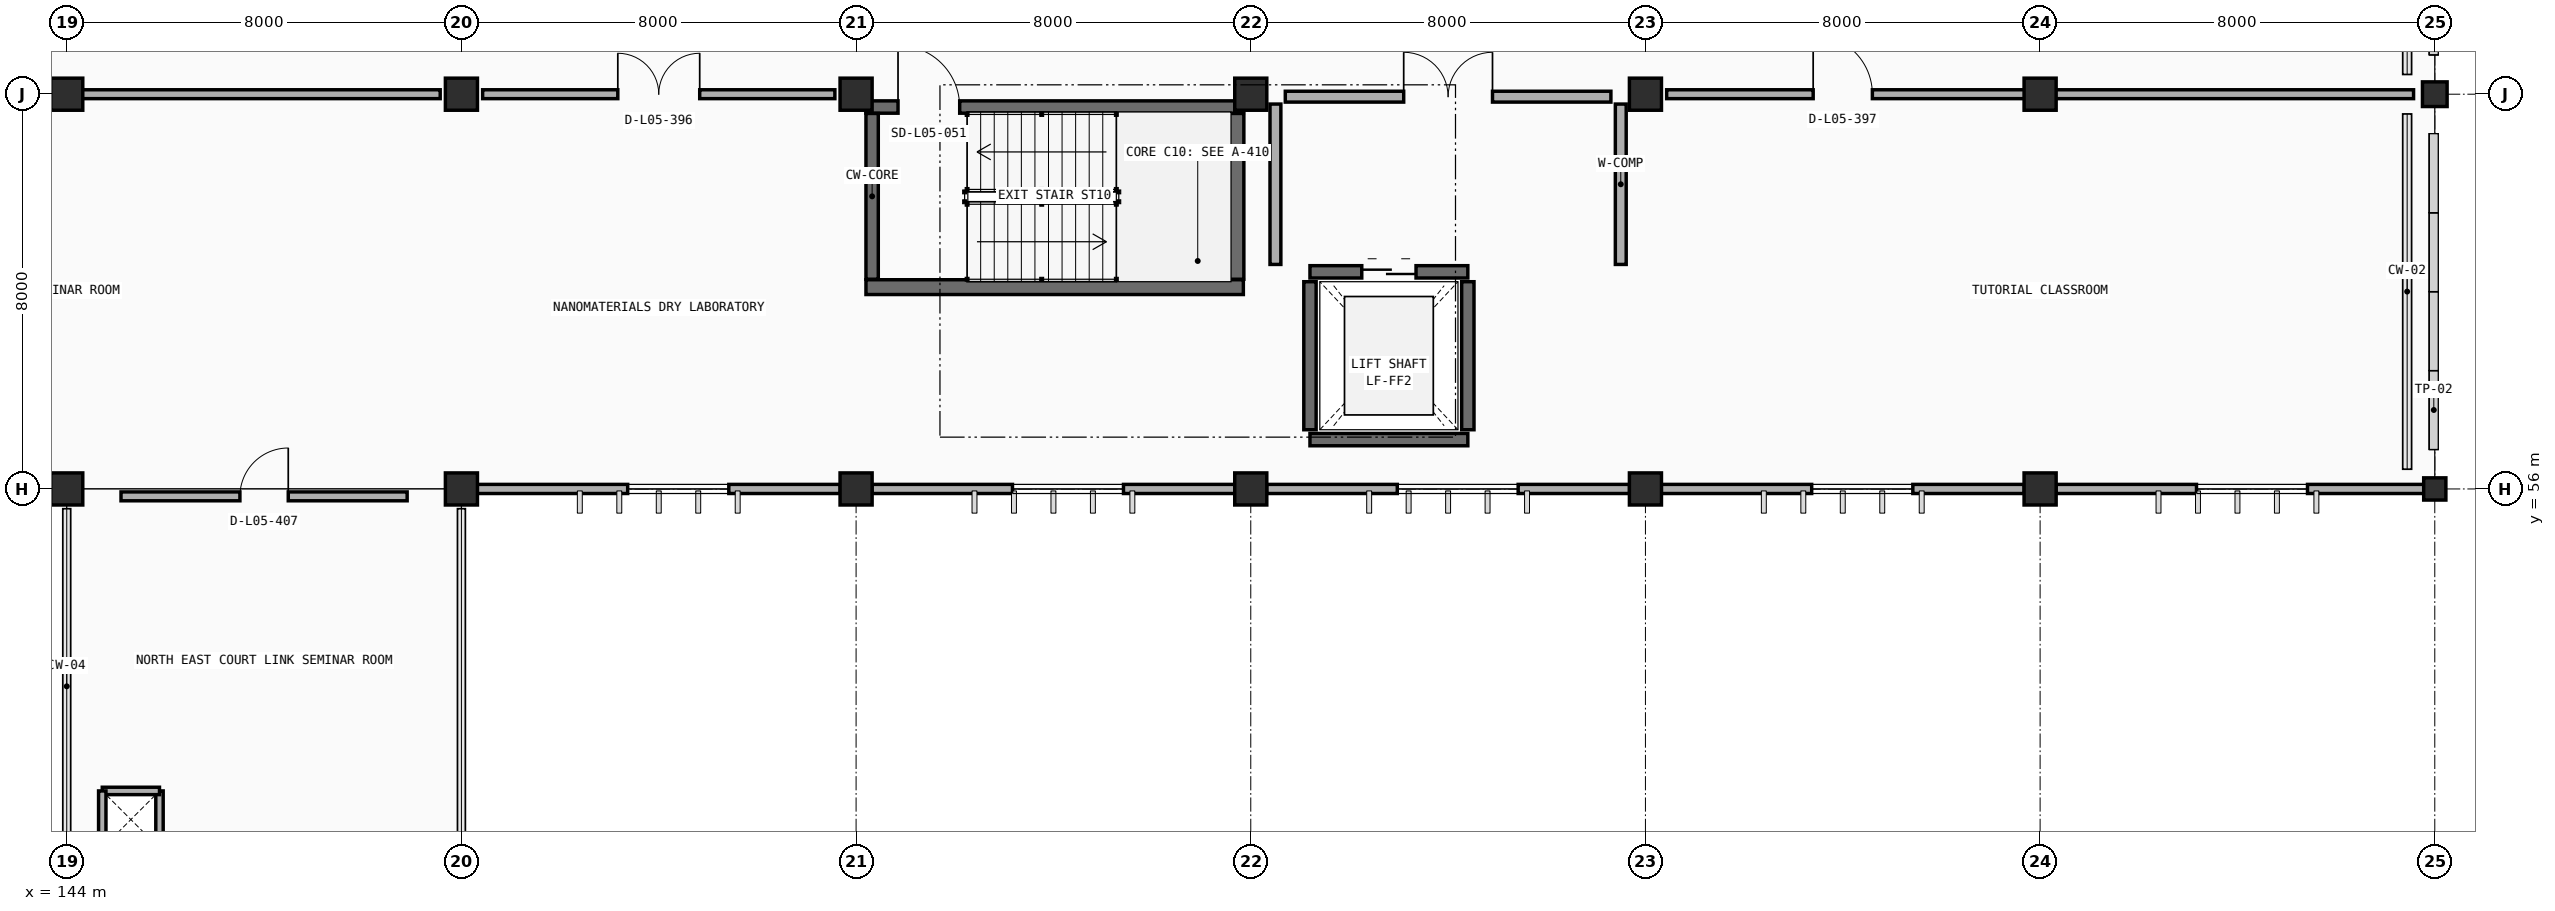
"""IFC4 building model, lengths in metres.
Left out: names, types, materials, properties, quantities, classifications, styles, units other than length and angle.
Written with IfcOpenShell. Run it as: python <this file> out.ifc"""

import sys

from ifc_helpers import new_model, si_unit, direction, frame, frame_2d, origin, origin_2d, place, context, subcontext, project, spatial, rectangle, extrude, element, fill, save


model = new_model("IFC4")
c1 = context("Model", 3, precision=1e-05, world=origin(), true_north=direction((0.0, 1.0)))
c2 = subcontext(c1, "Body", "Model", "MODEL_VIEW")
j1 = project(units=[si_unit("LENGTHUNIT", "METRE"), si_unit("PLANEANGLEUNIT", "RADIAN")], contexts=[c1])
p1 = place(None, origin())
s1 = spatial("IfcSite", under=j1, at=p1, CompositionType="ELEMENT")
p2 = place(p1, origin())
s2 = spatial("IfcBuilding", under=s1, at=p2, CompositionType="ELEMENT")
p3 = place(p2, frame((0.0, 0.0, 18.0)))
s3 = spatial("IfcBuildingStorey", under=s2, at=p3, CompositionType="ELEMENT", Elevation=18.0)
for number, where, z_axis, x_axis in (
    (1, (144.0, 56.0, 0.0), (0.0, 0.0, 1.0), (1.0, 0.0, 0.0)),
    (2, (152.0, 56.0, 0.0), (0.0, 0.0, 1.0), (1.0, 0.0, 0.0)),
    (3, (160.0, 56.0, 0.0), (0.0, 0.0, 1.0), (1.0, 0.0, 0.0)),
    (4, (168.0, 56.0, 0.0), (0.0, 0.0, 1.0), (1.0, 0.0, 0.0)),
    (5, (176.0, 56.0, 0.0), (0.0, 0.0, 1.0), (1.0, 0.0, 0.0)),
    (6, (184.0, 56.0, 0.0), (0.0, 0.0, 1.0), (1.0, 0.0, 0.0)),
):
    element("IfcColumn", number, at=place(p3, frame(where, z_axis=z_axis, x_axis=x_axis)), inside=s3, PredefinedType="COLUMN", context=c2, shape_type="SweptSolid", body=[
        extrude(rectangle(XDim=0.65, YDim=0.65, at=origin_2d()), origin(), (0.0, 0.0, 1.0), 4.2),
    ])
p4 = place(p3, frame((192.0, 56.0, 0.0), z_axis=(0.0, 0.0, 1.0), x_axis=(1.0, 0.0, 0.0)))
e7 = element("IfcColumn", 7, at=p4, inside=s3, PredefinedType="COLUMN", context=c2, shape_type="SweptSolid", body=[
    extrude(rectangle(XDim=0.45, YDim=0.45, at=origin_2d()), origin(), (0.0, 0.0, 1.0), 4.2),
])
for number, where, z_axis, x_axis in (
    (8, (144.0, 64.0, 0.0), (0.0, 0.0, 1.0), (1.0, 0.0, 0.0)),
    (9, (152.0, 64.0, 0.0), (0.0, 0.0, 1.0), (1.0, 0.0, 0.0)),
    (10, (160.0, 64.0, 0.0), (0.0, 0.0, 1.0), (1.0, 0.0, 0.0)),
    (11, (168.0, 64.0, 0.0), (0.0, 0.0, 1.0), (1.0, 0.0, 0.0)),
    (12, (176.0, 64.0, 0.0), (0.0, 0.0, 1.0), (1.0, 0.0, 0.0)),
    (13, (184.0, 64.0, 0.0), (0.0, 0.0, 1.0), (1.0, 0.0, 0.0)),
):
    element("IfcColumn", number, at=place(p3, frame(where, z_axis=z_axis, x_axis=x_axis)), inside=s3, PredefinedType="COLUMN", context=c2, shape_type="SweptSolid", body=[
        extrude(rectangle(XDim=0.65, YDim=0.65, at=origin_2d()), origin(), (0.0, 0.0, 1.0), 4.2),
    ])
p5 = place(p3, frame((192.0, 64.0, 0.0), z_axis=(0.0, 0.0, 1.0), x_axis=(1.0, 0.0, 0.0)))
e14 = element("IfcColumn", 14, at=p5, inside=s3, PredefinedType="COLUMN", context=c2, shape_type="SweptSolid", body=[
    extrude(rectangle(XDim=0.5, YDim=0.5, at=origin_2d()), origin(), (0.0, 0.0, 1.0), 4.2),
])
p6 = place(p3, frame((159.678, 56.0, 0.0), z_axis=(0.0, 0.0, 1.0), x_axis=(-1.0, 0.0, 0.0)))
e15 = element("IfcWall", 15, at=p6, inside=s3, PredefinedType="STANDARD", context=c2, shape_type="SweptSolid", body=[
    extrude(rectangle(XDim=7.356, YDim=0.185, at=frame_2d((3.678, 0.0))), origin(), (0.0, 0.0, 1.0), 3.335),
])
p7 = place(p6, frame((2.258, 0.0, 0.9)))
e16 = element("IfcOpeningElement", 16, at=p7, cuts=e15, PredefinedType="OPENING", context=c2, shape_type="SweptSolid", body=[
    extrude(rectangle(XDim=2.05, YDim=2.0, at=frame_2d((1.025, 1.0))), frame((0.0, 0.103, 0.0), z_axis=(0.0, -1.0, 0.0), x_axis=(1.0, 0.0, 0.0)), (0.0, 0.0, 1.0), 0.205),
])
p8 = place(p3, frame((167.678, 56.0, 0.0), z_axis=(0.0, 0.0, 1.0), x_axis=(-1.0, 0.0, 0.0)))
e17 = element("IfcWall", 17, at=p8, inside=s3, PredefinedType="STANDARD", context=c2, shape_type="SweptSolid", body=[
    extrude(rectangle(XDim=7.356, YDim=0.185, at=frame_2d((3.678, 0.0))), origin(), (0.0, 0.0, 1.0), 3.335),
])
p9 = place(p8, frame((2.258, 0.0, 0.9)))
e18 = element("IfcOpeningElement", 18, at=p9, cuts=e17, PredefinedType="OPENING", context=c2, shape_type="SweptSolid", body=[
    extrude(rectangle(XDim=2.25, YDim=2.0, at=frame_2d((1.125, 1.0))), frame((0.0, 0.103, 0.0), z_axis=(0.0, -1.0, 0.0), x_axis=(1.0, 0.0, 0.0)), (0.0, 0.0, 1.0), 0.205),
])
p10 = place(p3, frame((175.678, 56.0, 0.0), z_axis=(0.0, 0.0, 1.0), x_axis=(-1.0, 0.0, 0.0)))
e19 = element("IfcWall", 19, at=p10, inside=s3, PredefinedType="STANDARD", context=c2, shape_type="SweptSolid", body=[
    extrude(rectangle(XDim=7.356, YDim=0.185, at=frame_2d((3.678, 0.0))), origin(), (0.0, 0.0, 1.0), 3.335),
])
p11 = place(p10, frame((2.258, 0.0, 0.9)))
e20 = element("IfcOpeningElement", 20, at=p11, cuts=e19, PredefinedType="OPENING", context=c2, shape_type="SweptSolid", body=[
    extrude(rectangle(XDim=2.45, YDim=2.0, at=frame_2d((1.225, 1.0))), frame((0.0, 0.103, 0.0), z_axis=(0.0, -1.0, 0.0), x_axis=(1.0, 0.0, 0.0)), (0.0, 0.0, 1.0), 0.205),
])
p12 = place(p3, frame((183.678, 56.0, 0.0), z_axis=(0.0, 0.0, 1.0), x_axis=(-1.0, 0.0, 0.0)))
e21 = element("IfcWall", 21, at=p12, inside=s3, PredefinedType="STANDARD", context=c2, shape_type="SweptSolid", body=[
    extrude(rectangle(XDim=7.356, YDim=0.185, at=frame_2d((3.678, 0.0))), origin(), (0.0, 0.0, 1.0), 3.335),
])
p13 = place(p12, frame((2.258, 0.0, 0.9)))
e22 = element("IfcOpeningElement", 22, at=p13, cuts=e21, PredefinedType="OPENING", context=c2, shape_type="SweptSolid", body=[
    extrude(rectangle(XDim=2.05, YDim=2.0, at=frame_2d((1.025, 1.0))), frame((0.0, 0.103, 0.0), z_axis=(0.0, -1.0, 0.0), x_axis=(1.0, 0.0, 0.0)), (0.0, 0.0, 1.0), 0.205),
])
p14 = place(p3, frame((191.778, 56.0, 0.0), z_axis=(0.0, 0.0, 1.0), x_axis=(-1.0, 0.0, 0.0)))
e23 = element("IfcWall", 23, at=p14, inside=s3, PredefinedType="STANDARD", context=c2, shape_type="SweptSolid", body=[
    extrude(rectangle(XDim=7.456, YDim=0.185, at=frame_2d((3.728, 0.0))), origin(), (0.0, 0.0, 1.0), 3.35),
])
p15 = place(p14, frame((2.358, 0.0, 0.9)))
e24 = element("IfcOpeningElement", 24, at=p15, cuts=e23, PredefinedType="OPENING", context=c2, shape_type="SweptSolid", body=[
    extrude(rectangle(XDim=2.25, YDim=2.0, at=frame_2d((1.125, 1.0))), frame((0.0, 0.103, 0.0), z_axis=(0.0, -1.0, 0.0), x_axis=(1.0, 0.0, 0.0)), (0.0, 0.0, 1.0), 0.205),
])
for number, where, z_axis, x_axis in (
    (25, (191.76, 56.22, 0.0), (0.0, 0.0, 1.0), (-1.0, 0.0, 0.0)),
    (26, (191.76, 63.78, 0.0), (0.0, 0.0, 1.0), (-1.0, 0.0, 0.0)),
    (27, (191.76, 64.22, 0.0), (0.0, 0.0, 1.0), (-1.0, 0.0, 0.0)),
):
    element("IfcWall", number, at=place(p3, frame(where, z_axis=z_axis, x_axis=x_axis)), inside=s3, PredefinedType="PARAPET", context=c2, shape_type="SweptSolid", body=[
        extrude(rectangle(XDim=0.32, YDim=0.2, at=frame_2d((0.16, 0.0))), origin(), (0.0, 0.0, 1.0), 3.35),
    ])
p16 = place(p3, frame((160.2, 60.09, 0.0), z_axis=(0.0, 0.0, 1.0), x_axis=(1.0, 0.0, 0.0)))
e28 = element("IfcWall", 28, at=p16, inside=s3, PredefinedType="SHEAR", context=c2, shape_type="SweptSolid", body=[
    extrude(rectangle(XDim=7.65, YDim=0.3, at=frame_2d((3.825, 0.0))), origin(), (0.0, 0.0, 1.0), 4.2),
])
p17 = place(p3, frame((167.71, 60.25, 0.0), z_axis=(0.0, 0.0, 1.0), x_axis=(0.0, 1.0, 0.0)))
e29 = element("IfcWall", 29, at=p17, inside=s3, PredefinedType="SHEAR", context=c2, shape_type="SweptSolid", body=[
    extrude(rectangle(XDim=3.36, YDim=0.3, at=frame_2d((1.68, 0.0))), origin(), (0.0, 0.0, 1.0), 4.2),
])
p18 = place(p3, frame((160.2, 63.74, 0.0), z_axis=(0.0, 0.0, 1.0), x_axis=(1.0, 0.0, 0.0)))
e30 = element("IfcWall", 30, at=p18, inside=s3, PredefinedType="SOLIDWALL", context=c2, shape_type="SweptSolid", body=[
    extrude(rectangle(XDim=7.65, YDim=0.25, at=frame_2d((3.825, 0.0))), origin(), (0.0, 0.0, 1.0), 4.2),
])
p19 = place(p18, frame((0.65, 0.0, 0.0)))
e31 = element("IfcOpeningElement", 31, at=p19, cuts=e30, PredefinedType="OPENING", context=c2, shape_type="SweptSolid", body=[
    extrude(rectangle(XDim=1.25, YDim=2.15, at=frame_2d((0.625, 1.075))), frame((0.0, 0.135, 0.0), z_axis=(0.0, -1.0, 0.0), x_axis=(1.0, 0.0, 0.0)), (0.0, 0.0, 1.0), 0.27),
])
p20 = place(p3, frame((160.325, 60.25, 0.0), z_axis=(0.0, 0.0, 1.0), x_axis=(0.0, 1.0, 0.0)))
e32 = element("IfcWall", 32, at=p20, inside=s3, PredefinedType="SOLIDWALL", context=c2, shape_type="SweptSolid", body=[
    extrude(rectangle(XDim=3.36, YDim=0.25, at=frame_2d((1.68, 0.0))), origin(), (0.0, 0.0, 1.0), 4.2),
])
p21 = place(p3, frame((169.2, 57.0, 0.0), z_axis=(0.0, 0.0, 1.0), x_axis=(1.0, 0.0, 0.0)))
e33 = element("IfcWall", 33, at=p21, inside=s3, PredefinedType="SOLIDWALL", context=c2, shape_type="SweptSolid", body=[
    extrude(rectangle(XDim=3.2, YDim=0.25, at=frame_2d((1.6, 0.0))), origin(), (0.0, 0.0, 1.0), 4.2),
])
p22 = place(p3, frame((169.2, 60.4, 0.0), z_axis=(0.0, 0.0, 1.0), x_axis=(1.0, 0.0, 0.0)))
e34 = element("IfcWall", 34, at=p22, inside=s3, PredefinedType="SOLIDWALL", context=c2, shape_type="SweptSolid", body=[
    extrude(rectangle(XDim=3.2, YDim=0.25, at=frame_2d((1.6, 0.0))), origin(), (0.0, 0.0, 1.0), 4.2),
])
p23 = place(p22, frame((1.05, 0.0, 0.0)))
e35 = element("IfcOpeningElement", 35, at=p23, cuts=e34, PredefinedType="OPENING", context=c2, shape_type="SweptSolid", body=[
    extrude(rectangle(XDim=1.1, YDim=2.15, at=frame_2d((0.55, 1.075))), frame((0.0, 0.135, 0.0), z_axis=(0.0, -1.0, 0.0), x_axis=(1.0, 0.0, 0.0)), (0.0, 0.0, 1.0), 0.27),
])
for number, where, z_axis, x_axis in (
    (36, (169.2, 57.2, 0.0), (0.0, 0.0, 1.0), (0.0, 1.0, 0.0)),
    (37, (172.4, 57.2, 0.0), (0.0, 0.0, 1.0), (0.0, 1.0, 0.0)),
):
    element("IfcWall", number, at=place(p3, frame(where, z_axis=z_axis, x_axis=x_axis)), inside=s3, PredefinedType="SOLIDWALL", context=c2, shape_type="SweptSolid", body=[
        extrude(rectangle(XDim=3.0, YDim=0.25, at=frame_2d((1.5, 0.0))), origin(), (0.0, 0.0, 1.0), 4.2),
    ])
p24 = place(p3, frame((168.7, 63.95, 0.0), z_axis=(0.0, 0.0, 1.0), x_axis=(1.0, 0.0, 0.0)))
e38 = element("IfcWall", 38, at=p24, inside=s3, PredefinedType="PARTITIONING", context=c2, shape_type="SweptSolid", body=[
    extrude(rectangle(XDim=6.6, YDim=0.22, at=frame_2d((3.3, 0.0))), origin(), (0.0, 0.0, 1.0), 3.3),
])
p25 = place(p24, frame((2.4, 0.0, 0.0)))
e39 = element("IfcOpeningElement", 39, at=p25, cuts=e38, PredefinedType="OPENING", context=c2, shape_type="SweptSolid", body=[
    extrude(rectangle(XDim=1.8, YDim=2.2, at=frame_2d((0.9, 1.1))), frame((0.0, 0.12, 0.0), z_axis=(0.0, -1.0, 0.0), x_axis=(1.0, 0.0, 0.0)), (0.0, 0.0, 1.0), 0.24),
])
for number, where, z_axis, x_axis in (
    (40, (168.5, 60.55, 0.0), (0.0, 0.0, 1.0), (0.0, 1.0, 0.0)),
    (41, (175.5, 60.55, 0.0), (0.0, 0.0, 1.0), (0.0, 1.0, 0.0)),
):
    element("IfcWall", number, at=place(p3, frame(where, z_axis=z_axis, x_axis=x_axis)), inside=s3, PredefinedType="PARTITIONING", context=c2, shape_type="SweptSolid", body=[
        extrude(rectangle(XDim=3.25, YDim=0.22, at=frame_2d((1.625, 0.0))), origin(), (0.0, 0.0, 1.0), 3.3),
    ])
for number, where, z_axis, x_axis in (
    (42, (145.88, 48.72, 0.0), (0.0, 0.0, 1.0), (0.0, 1.0, 0.0)),
    (43, (145.88, 49.88, 0.0), (0.0, 0.0, 1.0), (-1.0, 0.0, 0.0)),
    (44, (144.72, 49.88, 0.0), (0.0, 0.0, 1.0), (0.0, -1.0, 0.0)),
):
    element("IfcWall", number, at=place(p3, frame(where, z_axis=z_axis, x_axis=x_axis)), inside=s3, PredefinedType="PARTITIONING", context=c2, shape_type="SweptSolid", body=[
        extrude(rectangle(XDim=1.16, YDim=0.15, at=frame_2d((0.58, 0.0))), origin(), (0.0, 0.0, 1.0), 3.9),
    ])
p26 = place(p3, frame((136.43, 64.0, 0.0), z_axis=(0.0, 0.0, 1.0), x_axis=(1.0, 0.0, 0.0)))
e45 = element("IfcWall", 45, at=p26, inside=s3, PredefinedType="PARTITIONING", context=c2, shape_type="SweptSolid", body=[
    extrude(rectangle(XDim=15.14, YDim=0.18, at=frame_2d((7.57, 0.0))), origin(), (0.0, 0.0, 1.0), 3.3),
])
p27 = place(p26, frame((3.0, 0.0, 0.0)))
e46 = element("IfcOpeningElement", 46, at=p27, cuts=e45, PredefinedType="OPENING", context=c2, shape_type="SweptSolid", body=[
    extrude(rectangle(XDim=1.14, YDim=2.15, at=frame_2d((0.57, 1.075))), frame((0.0, 0.1, 0.0), z_axis=(0.0, -1.0, 0.0), x_axis=(1.0, 0.0, 0.0)), (0.0, 0.0, 1.0), 0.2),
])
p28 = place(p3, frame((152.43, 64.0, 0.0), z_axis=(0.0, 0.0, 1.0), x_axis=(1.0, 0.0, 0.0)))
e47 = element("IfcWall", 47, at=p28, inside=s3, PredefinedType="PARTITIONING", context=c2, shape_type="SweptSolid", body=[
    extrude(rectangle(XDim=7.14, YDim=0.18, at=frame_2d((3.57, 0.0))), origin(), (0.0, 0.0, 1.0), 3.3),
])
p29 = place(p28, frame((2.74, 0.0, 0.0)))
e48 = element("IfcOpeningElement", 48, at=p29, cuts=e47, PredefinedType="OPENING", context=c2, shape_type="SweptSolid", body=[
    extrude(rectangle(XDim=1.66, YDim=2.22, at=frame_2d((0.83, 1.11))), frame((0.0, 0.1, 0.0), z_axis=(0.0, -1.0, 0.0), x_axis=(1.0, 0.0, 0.0)), (0.0, 0.0, 1.0), 0.2),
])
p30 = place(p3, frame((176.43, 64.0, 0.0), z_axis=(0.0, 0.0, 1.0), x_axis=(1.0, 0.0, 0.0)))
e49 = element("IfcWall", 49, at=p30, inside=s3, PredefinedType="PARTITIONING", context=c2, shape_type="SweptSolid", body=[
    extrude(rectangle(XDim=15.14, YDim=0.18, at=frame_2d((7.57, 0.0))), origin(), (0.0, 0.0, 1.0), 3.3),
])
p31 = place(p30, frame((2.97, 0.0, 0.0)))
e50 = element("IfcOpeningElement", 50, at=p31, cuts=e49, PredefinedType="OPENING", context=c2, shape_type="SweptSolid", body=[
    extrude(rectangle(XDim=1.2, YDim=2.2, at=frame_2d((0.6, 1.1))), frame((0.0, 0.1, 0.0), z_axis=(0.0, -1.0, 0.0), x_axis=(1.0, 0.0, 0.0)), (0.0, 0.0, 1.0), 0.2),
])
p32 = place(p3, frame((145.1, 55.85, 0.0), z_axis=(0.0, 0.0, 1.0), x_axis=(1.0, 0.0, 0.0)))
e51 = element("IfcWall", 51, at=p32, inside=s3, PredefinedType="PARTITIONING", context=c2, shape_type="SweptSolid", body=[
    extrude(rectangle(XDim=5.8, YDim=0.18, at=frame_2d((2.9, 0.0))), origin(), (0.0, 0.0, 1.0), 3.3),
])
p33 = place(p32, frame((2.41, 0.0, 0.0)))
e52 = element("IfcOpeningElement", 52, at=p33, cuts=e51, PredefinedType="OPENING", context=c2, shape_type="SweptSolid", body=[
    extrude(rectangle(XDim=0.98, YDim=2.1, at=frame_2d((0.49, 1.05))), frame((0.0, 0.1, 0.0), z_axis=(0.0, -1.0, 0.0), x_axis=(1.0, 0.0, 0.0)), (0.0, 0.0, 1.0), 0.2),
])
p34 = place(p7, origin())
e53 = element("IfcWindow", 53, at=p34, inside=s3, PartitioningType="DOUBLE_PANEL_VERTICAL", PredefinedType="WINDOW", context=c2, shape_type="SweptSolid", body=[
    extrude(rectangle(XDim=2.05, YDim=2.0, at=frame_2d((1.025, 1.0))), frame((0.0, 0.03, 0.0), z_axis=(0.0, -1.0, 0.0), x_axis=(1.0, 0.0, 0.0)), (0.0, 0.0, 1.0), 0.06),
])
fill(e16, e53)
p35 = place(p9, origin())
e54 = element("IfcWindow", 54, at=p35, inside=s3, PartitioningType="DOUBLE_PANEL_VERTICAL", PredefinedType="WINDOW", context=c2, shape_type="SweptSolid", body=[
    extrude(rectangle(XDim=2.25, YDim=2.0, at=frame_2d((1.125, 1.0))), frame((0.0, 0.03, 0.0), z_axis=(0.0, -1.0, 0.0), x_axis=(1.0, 0.0, 0.0)), (0.0, 0.0, 1.0), 0.06),
])
fill(e18, e54)
p36 = place(p11, origin())
e55 = element("IfcWindow", 55, at=p36, inside=s3, PartitioningType="DOUBLE_PANEL_VERTICAL", PredefinedType="WINDOW", context=c2, shape_type="SweptSolid", body=[
    extrude(rectangle(XDim=2.45, YDim=2.0, at=frame_2d((1.225, 1.0))), frame((0.0, 0.03, 0.0), z_axis=(0.0, -1.0, 0.0), x_axis=(1.0, 0.0, 0.0)), (0.0, 0.0, 1.0), 0.06),
])
fill(e20, e55)
p37 = place(p13, origin())
e56 = element("IfcWindow", 56, at=p37, inside=s3, PartitioningType="DOUBLE_PANEL_VERTICAL", PredefinedType="WINDOW", context=c2, shape_type="SweptSolid", body=[
    extrude(rectangle(XDim=2.05, YDim=2.0, at=frame_2d((1.025, 1.0))), frame((0.0, 0.03, 0.0), z_axis=(0.0, -1.0, 0.0), x_axis=(1.0, 0.0, 0.0)), (0.0, 0.0, 1.0), 0.06),
])
fill(e22, e56)
p38 = place(p15, origin())
e57 = element("IfcWindow", 57, at=p38, inside=s3, PartitioningType="DOUBLE_PANEL_VERTICAL", PredefinedType="WINDOW", context=c2, shape_type="SweptSolid", body=[
    extrude(rectangle(XDim=2.25, YDim=2.0, at=frame_2d((1.125, 1.0))), frame((0.0, 0.03, 0.0), z_axis=(0.0, -1.0, 0.0), x_axis=(1.0, 0.0, 0.0)), (0.0, 0.0, 1.0), 0.06),
])
fill(e24, e57)
p39 = place(p19, origin())
e58 = element("IfcDoor", 58, at=p39, inside=s3, OperationType="SINGLE_SWING_LEFT", PredefinedType="DOOR", context=c2, shape_type="SweptSolid", body=[
    extrude(rectangle(XDim=1.25, YDim=2.15, at=frame_2d((0.625, 1.075))), frame((0.0, 0.025, 0.0), z_axis=(0.0, -1.0, 0.0), x_axis=(1.0, 0.0, 0.0)), (0.0, 0.0, 1.0), 0.05),
])
fill(e31, e58)
p40 = place(p23, origin())
e59 = element("IfcDoor", 59, at=p40, inside=s3, OperationType="DOUBLE_DOOR_SLIDING", PredefinedType="DOOR", context=c2, shape_type="SweptSolid", body=[
    extrude(rectangle(XDim=1.1, YDim=2.15, at=frame_2d((0.55, 1.075))), frame((0.0, 0.025, 0.0), z_axis=(0.0, -1.0, 0.0), x_axis=(1.0, 0.0, 0.0)), (0.0, 0.0, 1.0), 0.05),
])
fill(e35, e59)
p41 = place(p25, origin())
e60 = element("IfcDoor", 60, at=p41, inside=s3, OperationType="DOUBLE_DOOR_SINGLE_SWING", PredefinedType="DOOR", context=c2, shape_type="SweptSolid", body=[
    extrude(rectangle(XDim=1.8, YDim=2.2, at=frame_2d((0.9, 1.1))), frame((0.0, 0.025, 0.0), z_axis=(0.0, -1.0, 0.0), x_axis=(1.0, 0.0, 0.0)), (0.0, 0.0, 1.0), 0.05),
])
fill(e39, e60)
p42 = place(p29, origin())
e61 = element("IfcDoor", 61, at=p42, inside=s3, OperationType="DOUBLE_DOOR_SINGLE_SWING", PredefinedType="DOOR", context=c2, shape_type="SweptSolid", body=[
    extrude(rectangle(XDim=1.66, YDim=2.22, at=frame_2d((0.83, 1.11))), frame((0.0, 0.025, 0.0), z_axis=(0.0, -1.0, 0.0), x_axis=(1.0, 0.0, 0.0)), (0.0, 0.0, 1.0), 0.05),
])
fill(e48, e61)
p43 = place(p31, origin())
e62 = element("IfcDoor", 62, at=p43, inside=s3, OperationType="SINGLE_SWING_LEFT", PredefinedType="DOOR", context=c2, shape_type="SweptSolid", body=[
    extrude(rectangle(XDim=1.2, YDim=2.2, at=frame_2d((0.6, 1.1))), frame((0.0, 0.025, 0.0), z_axis=(0.0, -1.0, 0.0), x_axis=(1.0, 0.0, 0.0)), (0.0, 0.0, 1.0), 0.05),
])
fill(e50, e62)
p44 = place(p33, origin())
e63 = element("IfcDoor", 63, at=p44, inside=s3, OperationType="SINGLE_SWING_RIGHT", PredefinedType="DOOR", context=c2, shape_type="SweptSolid", body=[
    extrude(rectangle(XDim=0.98, YDim=2.1, at=frame_2d((0.49, 1.05))), frame((0.0, 0.025, 0.0), z_axis=(0.0, -1.0, 0.0), x_axis=(1.0, 0.0, 0.0)), (0.0, 0.0, 1.0), 0.05),
])
fill(e52, e63)
save(model, sys.argv[1])
